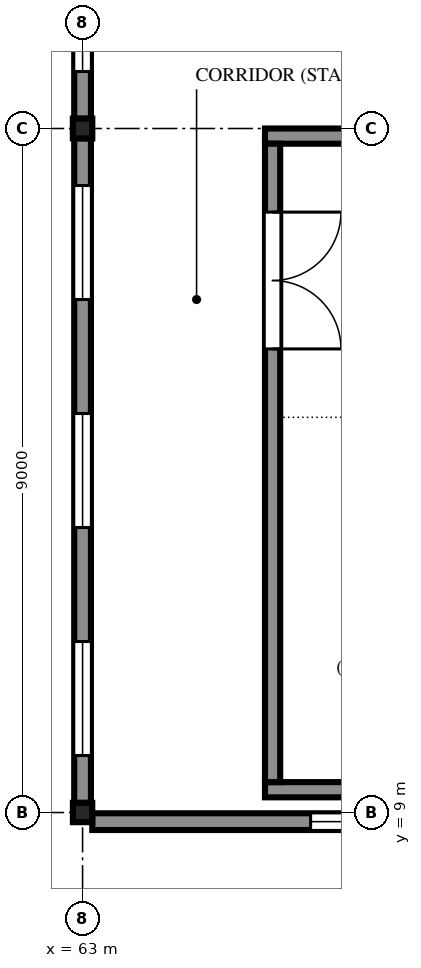
"""IFC4 building model, lengths in metres.
Left out: names, types, materials, properties, quantities, classifications, styles, units other than length and angle.
Written with IfcOpenShell. Run it as: python <this file> out.ifc"""

import sys

from ifc_helpers import new_model, si_unit, direction, frame, frame_2d, origin, origin_2d, place, context, subcontext, project, spatial, polyline, rectangle, i_section, outline, extrude, element, fill, save


model = new_model("IFC4")
c1 = context("Model", 3, precision=1e-05, world=origin(), true_north=direction((0.0, 1.0)))
c2 = subcontext(c1, "Body", "Model", "MODEL_VIEW")
j1 = project(units=[si_unit("LENGTHUNIT", "METRE"), si_unit("PLANEANGLEUNIT", "RADIAN")], contexts=[c1])
p1 = place(None, origin())
s1 = spatial("IfcSite", under=j1, at=p1, CompositionType="ELEMENT")
p2 = place(p1, origin())
s2 = spatial("IfcBuilding", under=s1, at=p2, CompositionType="ELEMENT")
p3 = place(p2, frame((0.0, 0.0, 7.5)))
s3 = spatial("IfcBuildingStorey", under=s2, at=p3, CompositionType="ELEMENT", Elevation=7.5)
p4 = place(p3, frame((63.0, 9.0, 0.0), z_axis=(0.0, 0.0, 1.0), x_axis=(1.0, 0.0, 0.0)))
e1 = element("IfcColumn", 1, at=p4, inside=s3, PredefinedType="COLUMN", context=c2, shape_type="SweptSolid", body=[
    extrude(i_section(OverallWidth=0.255, OverallDepth=0.254, WebThickness=0.009, FlangeThickness=0.014, FilletRadius=0.013, at=origin_2d()), origin(), (0.0, 0.0, 1.0), 4.2),
])
p5 = place(p3, frame((63.0, 18.0, 0.0), z_axis=(0.0, 0.0, 1.0), x_axis=(1.0, 0.0, 0.0)))
e2 = element("IfcColumn", 2, at=p5, inside=s3, PredefinedType="COLUMN", context=c2, shape_type="SweptSolid", body=[
    extrude(i_section(OverallWidth=0.256, OverallDepth=0.26, WebThickness=0.01, FlangeThickness=0.017, FilletRadius=0.013, at=origin_2d()), origin(), (0.0, 0.0, 1.0), 4.2),
])
p6 = place(p3, frame((63.127, 8.88, -0.13), z_axis=(0.0, 0.0, 1.0), x_axis=(1.0, 0.0, 0.0)))
e3 = element("IfcWall", 3, at=p6, inside=s3, PredefinedType="SOLIDWALL", context=c2, shape_type="SweptSolid", body=[
    extrude(rectangle(XDim=8.746, YDim=0.22, at=frame_2d((4.373, 0.0))), origin(), (0.0, 0.0, 1.0), 3.727),
])
p7 = place(p6, frame((2.873, 0.0, 1.03)))
e4 = element("IfcOpeningElement", 4, at=p7, cuts=e3, PredefinedType="OPENING", context=c2, shape_type="SweptSolid", body=[
    extrude(rectangle(XDim=3.0, YDim=2.1, at=frame_2d((1.5, 1.05))), frame((0.0, 0.12, 0.0), z_axis=(0.0, -1.0, 0.0), x_axis=(1.0, 0.0, 0.0)), (0.0, 0.0, 1.0), 0.24),
])
p8 = place(p3, frame((63.0, 9.127, 0.0), z_axis=(0.0, 0.0, 1.0), x_axis=(0.0, 1.0, 0.0)))
e5 = element("IfcWall", 5, at=p8, inside=s3, PredefinedType="SOLIDWALL", context=c2, shape_type="SweptSolid", body=[
    extrude(rectangle(XDim=8.743, YDim=0.22, at=frame_2d((4.372, 0.0))), origin(), (0.0, 0.0, 1.0), 3.597),
])
p9 = place(p8, frame((0.623, 0.0, 0.9)))
e6 = element("IfcOpeningElement", 6, at=p9, cuts=e5, PredefinedType="OPENING", context=c2, shape_type="SweptSolid", body=[
    extrude(rectangle(XDim=1.5, YDim=2.4, at=frame_2d((0.75, 1.2))), frame((0.0, 0.12, 0.0), z_axis=(0.0, -1.0, 0.0), x_axis=(1.0, 0.0, 0.0)), (0.0, 0.0, 1.0), 0.24),
])
p10 = place(p8, frame((3.623, 0.0, 0.9)))
e7 = element("IfcOpeningElement", 7, at=p10, cuts=e5, PredefinedType="OPENING", context=c2, shape_type="SweptSolid", body=[
    extrude(rectangle(XDim=1.5, YDim=2.4, at=frame_2d((0.75, 1.2))), frame((0.0, 0.12, 0.0), z_axis=(0.0, -1.0, 0.0), x_axis=(1.0, 0.0, 0.0)), (0.0, 0.0, 1.0), 0.24),
])
p11 = place(p8, frame((6.623, 0.0, 0.9)))
e8 = element("IfcOpeningElement", 8, at=p11, cuts=e5, PredefinedType="OPENING", context=c2, shape_type="SweptSolid", body=[
    extrude(rectangle(XDim=1.5, YDim=2.4, at=frame_2d((0.75, 1.2))), frame((0.0, 0.12, 0.0), z_axis=(0.0, -1.0, 0.0), x_axis=(1.0, 0.0, 0.0)), (0.0, 0.0, 1.0), 0.24),
])
p12 = place(p3, frame((63.0, 18.13, 0.0), z_axis=(0.0, 0.0, 1.0), x_axis=(0.0, 1.0, 0.0)))
e9 = element("IfcWall", 9, at=p12, inside=s3, PredefinedType="SOLIDWALL", context=c2, shape_type="SweptSolid", body=[
    extrude(rectangle(XDim=8.74, YDim=0.22, at=frame_2d((4.37, 0.0))), origin(), (0.0, 0.0, 1.0), 3.597),
])
p13 = place(p12, frame((0.62, 0.0, 0.9)))
e10 = element("IfcOpeningElement", 10, at=p13, cuts=e9, PredefinedType="OPENING", context=c2, shape_type="SweptSolid", body=[
    extrude(rectangle(XDim=1.5, YDim=2.4, at=frame_2d((0.75, 1.2))), frame((0.0, 0.12, 0.0), z_axis=(0.0, -1.0, 0.0), x_axis=(1.0, 0.0, 0.0)), (0.0, 0.0, 1.0), 0.24),
])
p14 = place(p12, frame((3.62, 0.0, 0.9)))
e11 = element("IfcOpeningElement", 11, at=p14, cuts=e9, PredefinedType="OPENING", context=c2, shape_type="SweptSolid", body=[
    extrude(rectangle(XDim=1.5, YDim=2.4, at=frame_2d((0.75, 1.2))), frame((0.0, 0.12, 0.0), z_axis=(0.0, -1.0, 0.0), x_axis=(1.0, 0.0, 0.0)), (0.0, 0.0, 1.0), 0.24),
])
p15 = place(p12, frame((6.62, 0.0, 0.9)))
e12 = element("IfcOpeningElement", 12, at=p15, cuts=e9, PredefinedType="OPENING", context=c2, shape_type="SweptSolid", body=[
    extrude(rectangle(XDim=1.5, YDim=2.4, at=frame_2d((0.75, 1.2))), frame((0.0, 0.12, 0.0), z_axis=(0.0, -1.0, 0.0), x_axis=(1.0, 0.0, 0.0)), (0.0, 0.0, 1.0), 0.24),
])
p16 = place(p3, frame((65.4, 9.3, 0.0), z_axis=(0.0, 0.0, 1.0), x_axis=(1.0, 0.0, 0.0)))
e13 = element("IfcWall", 13, at=p16, inside=s3, PredefinedType="SOLIDWALL", context=c2, shape_type="SweptSolid", body=[
    extrude(rectangle(XDim=4.2, YDim=0.2, at=frame_2d((2.1, 0.0))), origin(), (0.0, 0.0, 1.0), 3.59),
])
p17 = place(p3, frame((65.4, 17.9, -0.13), z_axis=(0.0, 0.0, 1.0), x_axis=(1.0, 0.0, 0.0)))
e14 = element("IfcWall", 14, at=p17, inside=s3, PredefinedType="SOLIDWALL", context=c2, shape_type="SweptSolid", body=[
    extrude(rectangle(XDim=4.2, YDim=0.2, at=frame_2d((2.1, 0.0))), origin(), (0.0, 0.0, 1.0), 3.72),
])
p18 = place(p17, frame((1.2, 0.0, 0.13)))
e15 = element("IfcOpeningElement", 15, at=p18, cuts=e14, PredefinedType="OPENING", context=c2, shape_type="SweptSolid", body=[
    extrude(rectangle(XDim=1.8, YDim=2.1, at=frame_2d((0.9, 1.05))), frame((0.0, 0.11, 0.0), z_axis=(0.0, -1.0, 0.0), x_axis=(1.0, 0.0, 0.0)), (0.0, 0.0, 1.0), 0.22),
])
p19 = place(p3, frame((65.5, 9.4, -0.13), z_axis=(0.0, 0.0, 1.0), x_axis=(0.0, 1.0, 0.0)))
e16 = element("IfcWall", 16, at=p19, inside=s3, PredefinedType="SOLIDWALL", context=c2, shape_type="SweptSolid", body=[
    extrude(rectangle(XDim=8.4, YDim=0.2, at=frame_2d((4.2, 0.0))), origin(), (0.0, 0.0, 1.0), 3.72),
])
p20 = place(p19, frame((5.7, 0.0, 0.13)))
e17 = element("IfcOpeningElement", 17, at=p20, cuts=e16, PredefinedType="OPENING", context=c2, shape_type="SweptSolid", body=[
    extrude(rectangle(XDim=1.8, YDim=2.1, at=frame_2d((0.9, 1.05))), frame((0.0, 0.11, 0.0), z_axis=(0.0, -1.0, 0.0), x_axis=(1.0, 0.0, 0.0)), (0.0, 0.0, 1.0), 0.22),
])
p21 = place(p7, origin())
e18 = element("IfcWindow", 18, at=p21, inside=s3, PartitioningType="TRIPLE_PANEL_VERTICAL", PredefinedType="WINDOW", context=c2, shape_type="SweptSolid", body=[
    extrude(outline(polyline([(0.0, 0.0), (3.0, 0.0), (3.0, 2.1), (0.0, 2.1), (0.0, 0.0)]), holes=[polyline([(0.07, 0.07), (2.93, 0.07), (2.93, 2.03), (0.07, 2.03), (0.07, 0.07)])]), frame((0.0, 0.03, 0.0), z_axis=(0.0, -1.0, 0.0), x_axis=(1.0, 0.0, 0.0)), (0.0, 0.0, 1.0), 0.06),
    extrude(rectangle(XDim=0.04, YDim=1.96, at=frame_2d((1.017, 1.05))), frame((0.0, 0.022, 0.0), z_axis=(0.0, -1.0, 0.0), x_axis=(1.0, 0.0, 0.0)), (0.0, 0.0, 1.0), 0.044),
    extrude(rectangle(XDim=0.04, YDim=1.96, at=frame_2d((1.983, 1.05))), frame((0.0, 0.022, 0.0), z_axis=(0.0, -1.0, 0.0), x_axis=(1.0, 0.0, 0.0)), (0.0, 0.0, 1.0), 0.044),
    extrude(outline(polyline([(0.07, 0.07), (0.997, 0.07), (0.997, 2.03), (0.07, 2.03), (0.07, 0.07)]), holes=[polyline([(0.1, 0.1), (0.967, 0.1), (0.967, 2.0), (0.1, 2.0), (0.1, 0.1)])]), frame((0.0, 0.022, 0.0), z_axis=(0.0, -1.0, 0.0), x_axis=(1.0, 0.0, 0.0)), (0.0, 0.0, 1.0), 0.045),
    extrude(rectangle(XDim=0.866, YDim=1.9, at=frame_2d((0.533, 1.05))), frame((0.0, 0.006, 0.0), z_axis=(0.0, -1.0, 0.0), x_axis=(1.0, 0.0, 0.0)), (0.0, 0.0, 1.0), 0.012),
    extrude(outline(polyline([(1.037, 0.07), (1.963, 0.07), (1.963, 2.03), (1.037, 2.03), (1.037, 0.07)]), holes=[polyline([(1.067, 0.1), (1.933, 0.1), (1.933, 2.0), (1.067, 2.0), (1.067, 0.1)])]), frame((0.0, 0.022, 0.0), z_axis=(0.0, -1.0, 0.0), x_axis=(1.0, 0.0, 0.0)), (0.0, 0.0, 1.0), 0.045),
    extrude(rectangle(XDim=0.867, YDim=1.9, at=frame_2d((1.5, 1.05))), frame((0.0, 0.006, 0.0), z_axis=(0.0, -1.0, 0.0), x_axis=(1.0, 0.0, 0.0)), (0.0, 0.0, 1.0), 0.012),
    extrude(outline(polyline([(2.003, 0.07), (2.93, 0.07), (2.93, 2.03), (2.003, 2.03), (2.003, 0.07)]), holes=[polyline([(2.033, 0.1), (2.9, 0.1), (2.9, 2.0), (2.033, 2.0), (2.033, 0.1)])]), frame((0.0, 0.022, 0.0), z_axis=(0.0, -1.0, 0.0), x_axis=(1.0, 0.0, 0.0)), (0.0, 0.0, 1.0), 0.045),
    extrude(rectangle(XDim=0.866, YDim=1.9, at=frame_2d((2.467, 1.05))), frame((0.0, 0.006, 0.0), z_axis=(0.0, -1.0, 0.0), x_axis=(1.0, 0.0, 0.0)), (0.0, 0.0, 1.0), 0.012),
])
fill(e4, e18)
p22 = place(p9, origin())
e19 = element("IfcWindow", 19, at=p22, inside=s3, PartitioningType="DOUBLE_PANEL_VERTICAL", PredefinedType="WINDOW", context=c2, shape_type="SweptSolid", body=[
    extrude(outline(polyline([(0.0, 0.0), (1.5, 0.0), (1.5, 2.4), (0.0, 2.4), (0.0, 0.0)]), holes=[polyline([(0.07, 0.07), (1.43, 0.07), (1.43, 2.33), (0.07, 2.33), (0.07, 0.07)])]), frame((0.0, 0.03, 0.0), z_axis=(0.0, -1.0, 0.0), x_axis=(1.0, 0.0, 0.0)), (0.0, 0.0, 1.0), 0.06),
    extrude(rectangle(XDim=0.04, YDim=2.26, at=frame_2d((0.75, 1.2))), frame((0.0, 0.022, 0.0), z_axis=(0.0, -1.0, 0.0), x_axis=(1.0, 0.0, 0.0)), (0.0, 0.0, 1.0), 0.044),
    extrude(outline(polyline([(0.07, 0.07), (0.73, 0.07), (0.73, 2.33), (0.07, 2.33), (0.07, 0.07)]), holes=[polyline([(0.1, 0.1), (0.7, 0.1), (0.7, 2.3), (0.1, 2.3), (0.1, 0.1)])]), frame((0.0, 0.022, 0.0), z_axis=(0.0, -1.0, 0.0), x_axis=(1.0, 0.0, 0.0)), (0.0, 0.0, 1.0), 0.045),
    extrude(rectangle(XDim=0.6, YDim=2.2, at=frame_2d((0.4, 1.2))), frame((0.0, 0.006, 0.0), z_axis=(0.0, -1.0, 0.0), x_axis=(1.0, 0.0, 0.0)), (0.0, 0.0, 1.0), 0.012),
    extrude(outline(polyline([(0.77, 0.07), (1.43, 0.07), (1.43, 2.33), (0.77, 2.33), (0.77, 0.07)]), holes=[polyline([(0.8, 0.1), (1.4, 0.1), (1.4, 2.3), (0.8, 2.3), (0.8, 0.1)])]), frame((0.0, 0.022, 0.0), z_axis=(0.0, -1.0, 0.0), x_axis=(1.0, 0.0, 0.0)), (0.0, 0.0, 1.0), 0.045),
    extrude(rectangle(XDim=0.6, YDim=2.2, at=frame_2d((1.1, 1.2))), frame((0.0, 0.006, 0.0), z_axis=(0.0, -1.0, 0.0), x_axis=(1.0, 0.0, 0.0)), (0.0, 0.0, 1.0), 0.012),
])
fill(e6, e19)
p23 = place(p10, origin())
e20 = element("IfcWindow", 20, at=p23, inside=s3, PartitioningType="DOUBLE_PANEL_VERTICAL", PredefinedType="WINDOW", context=c2, shape_type="SweptSolid", body=[
    extrude(outline(polyline([(0.0, 0.0), (1.5, 0.0), (1.5, 2.4), (0.0, 2.4), (0.0, 0.0)]), holes=[polyline([(0.07, 0.07), (1.43, 0.07), (1.43, 2.33), (0.07, 2.33), (0.07, 0.07)])]), frame((0.0, 0.03, 0.0), z_axis=(0.0, -1.0, 0.0), x_axis=(1.0, 0.0, 0.0)), (0.0, 0.0, 1.0), 0.06),
    extrude(rectangle(XDim=0.04, YDim=2.26, at=frame_2d((0.75, 1.2))), frame((0.0, 0.022, 0.0), z_axis=(0.0, -1.0, 0.0), x_axis=(1.0, 0.0, 0.0)), (0.0, 0.0, 1.0), 0.044),
    extrude(outline(polyline([(0.07, 0.07), (0.73, 0.07), (0.73, 2.33), (0.07, 2.33), (0.07, 0.07)]), holes=[polyline([(0.1, 0.1), (0.7, 0.1), (0.7, 2.3), (0.1, 2.3), (0.1, 0.1)])]), frame((0.0, 0.022, 0.0), z_axis=(0.0, -1.0, 0.0), x_axis=(1.0, 0.0, 0.0)), (0.0, 0.0, 1.0), 0.045),
    extrude(rectangle(XDim=0.6, YDim=2.2, at=frame_2d((0.4, 1.2))), frame((0.0, 0.006, 0.0), z_axis=(0.0, -1.0, 0.0), x_axis=(1.0, 0.0, 0.0)), (0.0, 0.0, 1.0), 0.012),
    extrude(outline(polyline([(0.77, 0.07), (1.43, 0.07), (1.43, 2.33), (0.77, 2.33), (0.77, 0.07)]), holes=[polyline([(0.8, 0.1), (1.4, 0.1), (1.4, 2.3), (0.8, 2.3), (0.8, 0.1)])]), frame((0.0, 0.022, 0.0), z_axis=(0.0, -1.0, 0.0), x_axis=(1.0, 0.0, 0.0)), (0.0, 0.0, 1.0), 0.045),
    extrude(rectangle(XDim=0.6, YDim=2.2, at=frame_2d((1.1, 1.2))), frame((0.0, 0.006, 0.0), z_axis=(0.0, -1.0, 0.0), x_axis=(1.0, 0.0, 0.0)), (0.0, 0.0, 1.0), 0.012),
])
fill(e7, e20)
p24 = place(p11, origin())
e21 = element("IfcWindow", 21, at=p24, inside=s3, PartitioningType="DOUBLE_PANEL_VERTICAL", PredefinedType="WINDOW", context=c2, shape_type="SweptSolid", body=[
    extrude(outline(polyline([(0.0, 0.0), (1.5, 0.0), (1.5, 2.4), (0.0, 2.4), (0.0, 0.0)]), holes=[polyline([(0.07, 0.07), (1.43, 0.07), (1.43, 2.33), (0.07, 2.33), (0.07, 0.07)])]), frame((0.0, 0.03, 0.0), z_axis=(0.0, -1.0, 0.0), x_axis=(1.0, 0.0, 0.0)), (0.0, 0.0, 1.0), 0.06),
    extrude(rectangle(XDim=0.04, YDim=2.26, at=frame_2d((0.75, 1.2))), frame((0.0, 0.022, 0.0), z_axis=(0.0, -1.0, 0.0), x_axis=(1.0, 0.0, 0.0)), (0.0, 0.0, 1.0), 0.044),
    extrude(outline(polyline([(0.07, 0.07), (0.73, 0.07), (0.73, 2.33), (0.07, 2.33), (0.07, 0.07)]), holes=[polyline([(0.1, 0.1), (0.7, 0.1), (0.7, 2.3), (0.1, 2.3), (0.1, 0.1)])]), frame((0.0, 0.022, 0.0), z_axis=(0.0, -1.0, 0.0), x_axis=(1.0, 0.0, 0.0)), (0.0, 0.0, 1.0), 0.045),
    extrude(rectangle(XDim=0.6, YDim=2.2, at=frame_2d((0.4, 1.2))), frame((0.0, 0.006, 0.0), z_axis=(0.0, -1.0, 0.0), x_axis=(1.0, 0.0, 0.0)), (0.0, 0.0, 1.0), 0.012),
    extrude(outline(polyline([(0.77, 0.07), (1.43, 0.07), (1.43, 2.33), (0.77, 2.33), (0.77, 0.07)]), holes=[polyline([(0.8, 0.1), (1.4, 0.1), (1.4, 2.3), (0.8, 2.3), (0.8, 0.1)])]), frame((0.0, 0.022, 0.0), z_axis=(0.0, -1.0, 0.0), x_axis=(1.0, 0.0, 0.0)), (0.0, 0.0, 1.0), 0.045),
    extrude(rectangle(XDim=0.6, YDim=2.2, at=frame_2d((1.1, 1.2))), frame((0.0, 0.006, 0.0), z_axis=(0.0, -1.0, 0.0), x_axis=(1.0, 0.0, 0.0)), (0.0, 0.0, 1.0), 0.012),
])
fill(e8, e21)
p25 = place(p13, origin())
e22 = element("IfcWindow", 22, at=p25, inside=s3, PartitioningType="DOUBLE_PANEL_VERTICAL", PredefinedType="WINDOW", context=c2, shape_type="SweptSolid", body=[
    extrude(outline(polyline([(0.0, 0.0), (1.5, 0.0), (1.5, 2.4), (0.0, 2.4), (0.0, 0.0)]), holes=[polyline([(0.07, 0.07), (1.43, 0.07), (1.43, 2.33), (0.07, 2.33), (0.07, 0.07)])]), frame((0.0, 0.03, 0.0), z_axis=(0.0, -1.0, 0.0), x_axis=(1.0, 0.0, 0.0)), (0.0, 0.0, 1.0), 0.06),
    extrude(rectangle(XDim=0.04, YDim=2.26, at=frame_2d((0.75, 1.2))), frame((0.0, 0.022, 0.0), z_axis=(0.0, -1.0, 0.0), x_axis=(1.0, 0.0, 0.0)), (0.0, 0.0, 1.0), 0.044),
    extrude(outline(polyline([(0.07, 0.07), (0.73, 0.07), (0.73, 2.33), (0.07, 2.33), (0.07, 0.07)]), holes=[polyline([(0.1, 0.1), (0.7, 0.1), (0.7, 2.3), (0.1, 2.3), (0.1, 0.1)])]), frame((0.0, 0.022, 0.0), z_axis=(0.0, -1.0, 0.0), x_axis=(1.0, 0.0, 0.0)), (0.0, 0.0, 1.0), 0.045),
    extrude(rectangle(XDim=0.6, YDim=2.2, at=frame_2d((0.4, 1.2))), frame((0.0, 0.006, 0.0), z_axis=(0.0, -1.0, 0.0), x_axis=(1.0, 0.0, 0.0)), (0.0, 0.0, 1.0), 0.012),
    extrude(outline(polyline([(0.77, 0.07), (1.43, 0.07), (1.43, 2.33), (0.77, 2.33), (0.77, 0.07)]), holes=[polyline([(0.8, 0.1), (1.4, 0.1), (1.4, 2.3), (0.8, 2.3), (0.8, 0.1)])]), frame((0.0, 0.022, 0.0), z_axis=(0.0, -1.0, 0.0), x_axis=(1.0, 0.0, 0.0)), (0.0, 0.0, 1.0), 0.045),
    extrude(rectangle(XDim=0.6, YDim=2.2, at=frame_2d((1.1, 1.2))), frame((0.0, 0.006, 0.0), z_axis=(0.0, -1.0, 0.0), x_axis=(1.0, 0.0, 0.0)), (0.0, 0.0, 1.0), 0.012),
])
fill(e10, e22)
p26 = place(p20, frame((1.8, 0.0, 0.0), z_axis=(0.0, 0.0, 1.0), x_axis=(-1.0, 0.0, 0.0)))
e23 = element("IfcDoor", 23, at=p26, inside=s3, OperationType="DOUBLE_DOOR_SINGLE_SWING", PredefinedType="DOOR", context=c2, shape_type="SweptSolid", body=[
    extrude(outline(polyline([(0.0, 0.0), (0.07, 0.0), (0.07, 2.03), (1.73, 2.03), (1.73, 0.0), (1.8, 0.0), (1.8, 2.1), (0.0, 2.1), (0.0, 0.0)])), frame((0.0, 0.025, 0.0), z_axis=(0.0, -1.0, 0.0), x_axis=(1.0, 0.0, 0.0)), (0.0, 0.0, 1.0), 0.05),
    extrude(outline(polyline([(0.074, 0.01), (0.897, 0.01), (0.897, 2.026), (0.074, 2.026), (0.074, 0.01)]), holes=[polyline([(0.194, 0.16), (0.777, 0.16), (0.777, 1.01), (0.194, 1.01), (0.194, 0.16)]), polyline([(0.335, 1.16), (0.635, 1.16), (0.635, 1.76), (0.335, 1.76), (0.335, 1.16)])]), frame((0.0, 0.017, 0.0), z_axis=(0.0, -1.0, 0.0), x_axis=(1.0, 0.0, 0.0)), (0.0, 0.0, 1.0), 0.035),
    extrude(rectangle(XDim=0.583, YDim=0.85, at=frame_2d((0.485, 0.585))), frame((0.0, 0.009, 0.0), z_axis=(0.0, -1.0, 0.0), x_axis=(1.0, 0.0, 0.0)), (0.0, 0.0, 1.0), 0.017),
    extrude(rectangle(XDim=0.3, YDim=0.6, at=frame_2d((0.485, 1.46))), frame((0.0, 0.006, 0.0), z_axis=(0.0, -1.0, 0.0), x_axis=(1.0, 0.0, 0.0)), (0.0, 0.0, 1.0), 0.012),
    extrude(outline(polyline([(0.903, 0.01), (1.726, 0.01), (1.726, 2.026), (0.903, 2.026), (0.903, 0.01)]), holes=[polyline([(1.023, 0.16), (1.606, 0.16), (1.606, 1.01), (1.023, 1.01), (1.023, 0.16)]), polyline([(1.165, 1.16), (1.465, 1.16), (1.465, 1.76), (1.165, 1.76), (1.165, 1.16)])]), frame((0.0, 0.017, 0.0), z_axis=(0.0, -1.0, 0.0), x_axis=(1.0, 0.0, 0.0)), (0.0, 0.0, 1.0), 0.035),
    extrude(rectangle(XDim=0.583, YDim=0.85, at=frame_2d((1.314, 0.585))), frame((0.0, 0.009, 0.0), z_axis=(0.0, -1.0, 0.0), x_axis=(1.0, 0.0, 0.0)), (0.0, 0.0, 1.0), 0.017),
    extrude(rectangle(XDim=0.3, YDim=0.6, at=frame_2d((1.314, 1.46))), frame((0.0, 0.006, 0.0), z_axis=(0.0, -1.0, 0.0), x_axis=(1.0, 0.0, 0.0)), (0.0, 0.0, 1.0), 0.012),
])
fill(e17, e23)
save(model, sys.argv[1])
